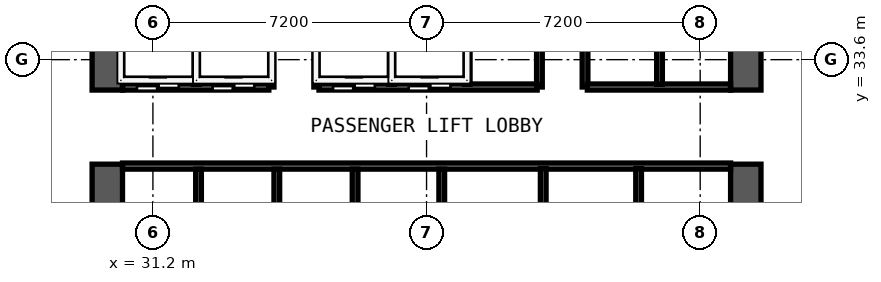
"""IFC4 building model, lengths in metres.
Left out: names, types, materials, properties, quantities, classifications, styles, units other than length and angle.
Written with IfcOpenShell. Run it as: python <this file> out.ifc"""

import sys

from ifc_helpers import new_model, si_unit, direction, frame, frame_2d, origin, place, context, subcontext, project, spatial, rectangle, extrude, element, fill, save


model = new_model("IFC4")
c1 = context("Model", 3, precision=1e-05, world=origin(), true_north=direction((0.0, 1.0)))
c2 = subcontext(c1, "Body", "Model", "MODEL_VIEW")
j1 = project(units=[si_unit("LENGTHUNIT", "METRE"), si_unit("PLANEANGLEUNIT", "RADIAN")], contexts=[c1])
p1 = place(None, origin())
s1 = spatial("IfcSite", under=j1, at=p1, CompositionType="ELEMENT")
p2 = place(p1, origin())
s2 = spatial("IfcBuilding", under=s1, at=p2, CompositionType="ELEMENT")
p3 = place(p2, frame((0.0, 0.0, 47.6)))
s3 = spatial("IfcBuildingStorey", under=s2, at=p3, CompositionType="ELEMENT", Elevation=47.6)
p4 = place(p3, frame((30.0, 26.8, 0.0), z_axis=(0.0, 0.0, 1.0), x_axis=(0.0, 1.0, 0.0)))
e1 = element("IfcWall", 1, at=p4, inside=s3, PredefinedType="SHEAR", context=c2, shape_type="SweptSolid", body=[
    extrude(rectangle(XDim=4.05, YDim=0.8, at=frame_2d((2.025, 0.0))), origin(), (0.0, 0.0, 1.0), 3.6),
])
p5 = place(p3, frame((30.0, 32.8, 0.0), z_axis=(0.0, 0.0, 1.0), x_axis=(0.0, 1.0, 0.0)))
e2 = element("IfcWall", 2, at=p5, inside=s3, PredefinedType="SHEAR", context=c2, shape_type="SweptSolid", body=[
    extrude(rectangle(XDim=10.0, YDim=0.8, at=frame_2d((5.0, 0.0))), origin(), (0.0, 0.0, 1.0), 3.6),
])
p6 = place(p3, frame((46.8, 26.8, 0.0), z_axis=(0.0, 0.0, 1.0), x_axis=(0.0, 1.0, 0.0)))
e3 = element("IfcWall", 3, at=p6, inside=s3, PredefinedType="SHEAR", context=c2, shape_type="SweptSolid", body=[
    extrude(rectangle(XDim=4.05, YDim=0.8, at=frame_2d((2.025, 0.0))), origin(), (0.0, 0.0, 1.0), 3.6),
])
p7 = place(p3, frame((46.8, 32.8, 0.0), z_axis=(0.0, 0.0, 1.0), x_axis=(0.0, 1.0, 0.0)))
e4 = element("IfcWall", 4, at=p7, inside=s3, PredefinedType="SHEAR", context=c2, shape_type="SweptSolid", body=[
    extrude(rectangle(XDim=10.0, YDim=0.8, at=frame_2d((5.0, 0.0))), origin(), (0.0, 0.0, 1.0), 3.6),
])
for number, where, z_axis, x_axis in (
    (5, (34.31, 32.88, 0.0), (0.0, 0.0, 1.0), (0.0, 1.0, 0.0)),
    (6, (35.51, 32.88, 0.0), (0.0, 0.0, 1.0), (0.0, 1.0, 0.0)),
    (7, (41.37, 32.88, 0.0), (0.0, 0.0, 1.0), (0.0, 1.0, 0.0)),
    (8, (42.57, 32.88, 0.0), (0.0, 0.0, 1.0), (0.0, 1.0, 0.0)),
):
    element("IfcWall", number, at=place(p3, frame(where, z_axis=z_axis, x_axis=x_axis)), inside=s3, PredefinedType="SOLIDWALL", context=c2, shape_type="SweptSolid", body=[
        extrude(rectangle(XDim=2.17, YDim=0.15, at=frame_2d((1.085, 0.0))), origin(), (0.0, 0.0, 1.0), 3.6),
    ])
p8 = place(p3, frame((30.4, 32.88, 0.0), z_axis=(0.0, 0.0, 1.0), x_axis=(1.0, 0.0, 0.0)))
e9 = element("IfcWall", 9, at=p8, inside=s3, PredefinedType="SOLIDWALL", context=c2, shape_type="SweptSolid", body=[
    extrude(rectangle(XDim=3.85, YDim=0.16, at=frame_2d((1.925, 0.0))), origin(), (0.0, 0.0, 1.0), 3.6),
])
p9 = place(p8, frame((1.48, 0.0, 0.0), z_axis=(0.0, 0.0, 1.0), x_axis=(-1.0, 0.0, 0.0)))
e10 = element("IfcOpeningElement", 10, at=p9, cuts=e9, PredefinedType="OPENING", context=c2, shape_type="SweptSolid", body=[
    extrude(rectangle(XDim=1.1, YDim=2.2, at=frame_2d((0.55, 1.1))), frame((0.0, 0.09, 0.0), z_axis=(0.0, -1.0, 0.0), x_axis=(1.0, 0.0, 0.0)), (0.0, 0.0, 1.0), 0.18),
])
p10 = place(p8, frame((3.47, 0.0, 0.0), z_axis=(0.0, 0.0, 1.0), x_axis=(-1.0, 0.0, 0.0)))
e11 = element("IfcOpeningElement", 11, at=p10, cuts=e9, PredefinedType="OPENING", context=c2, shape_type="SweptSolid", body=[
    extrude(rectangle(XDim=1.1, YDim=2.2, at=frame_2d((0.55, 1.1))), frame((0.0, 0.09, 0.0), z_axis=(0.0, -1.0, 0.0), x_axis=(1.0, 0.0, 0.0)), (0.0, 0.0, 1.0), 0.18),
])
p11 = place(p3, frame((35.57, 32.88, 0.0), z_axis=(0.0, 0.0, 1.0), x_axis=(1.0, 0.0, 0.0)))
e12 = element("IfcWall", 12, at=p11, inside=s3, PredefinedType="SOLIDWALL", context=c2, shape_type="SweptSolid", body=[
    extrude(rectangle(XDim=5.74, YDim=0.16, at=frame_2d((2.87, 0.0))), origin(), (0.0, 0.0, 1.0), 3.6),
])
p12 = place(p11, frame((1.47, 0.0, 0.0), z_axis=(0.0, 0.0, 1.0), x_axis=(-1.0, 0.0, 0.0)))
e13 = element("IfcOpeningElement", 13, at=p12, cuts=e12, PredefinedType="OPENING", context=c2, shape_type="SweptSolid", body=[
    extrude(rectangle(XDim=1.1, YDim=2.2, at=frame_2d((0.55, 1.1))), frame((0.0, 0.09, 0.0), z_axis=(0.0, -1.0, 0.0), x_axis=(1.0, 0.0, 0.0)), (0.0, 0.0, 1.0), 0.18),
])
p13 = place(p11, frame((3.46, 0.0, 0.0), z_axis=(0.0, 0.0, 1.0), x_axis=(-1.0, 0.0, 0.0)))
e14 = element("IfcOpeningElement", 14, at=p13, cuts=e12, PredefinedType="OPENING", context=c2, shape_type="SweptSolid", body=[
    extrude(rectangle(XDim=1.1, YDim=2.2, at=frame_2d((0.55, 1.1))), frame((0.0, 0.09, 0.0), z_axis=(0.0, -1.0, 0.0), x_axis=(1.0, 0.0, 0.0)), (0.0, 0.0, 1.0), 0.18),
])
p14 = place(p3, frame((42.63, 32.88, 0.0), z_axis=(0.0, 0.0, 1.0), x_axis=(1.0, 0.0, 0.0)))
e15 = element("IfcWall", 15, at=p14, inside=s3, PredefinedType="SOLIDWALL", context=c2, shape_type="SweptSolid", body=[
    extrude(rectangle(XDim=3.77, YDim=0.16, at=frame_2d((1.885, 0.0))), origin(), (0.0, 0.0, 1.0), 3.6),
])
for number, where, z_axis, x_axis in (
    (16, (32.34, 32.95, 0.0), (0.0, 0.0, 1.0), (0.0, 1.0, 0.0)),
    (17, (37.48, 32.95, 0.0), (0.0, 0.0, 1.0), (0.0, 1.0, 0.0)),
    (18, (39.47, 32.95, 0.0), (0.0, 0.0, 1.0), (0.0, 1.0, 0.0)),
    (19, (44.53, 32.95, 0.0), (0.0, 0.0, 1.0), (0.0, 1.0, 0.0)),
):
    element("IfcWall", number, at=place(p3, frame(where, z_axis=z_axis, x_axis=x_axis)), inside=s3, PredefinedType="SOLIDWALL", context=c2, shape_type="SweptSolid", body=[
        extrude(rectangle(XDim=2.05, YDim=0.15, at=frame_2d((1.025, 0.0))), origin(), (0.0, 0.0, 1.0), 3.6),
    ])
p15 = place(p3, frame((30.4, 30.8, 0.0), z_axis=(0.0, 0.0, 1.0), x_axis=(1.0, 0.0, 0.0)))
e20 = element("IfcWall", 20, at=p15, inside=s3, PredefinedType="SOLIDWALL", context=c2, shape_type="SweptSolid", body=[
    extrude(rectangle(XDim=16.0, YDim=0.16, at=frame_2d((8.0, 0.0))), origin(), (0.0, 0.0, 1.0), 3.6),
])
for number, where, z_axis, x_axis in (
    (21, (32.4, 28.735, 0.0), (0.0, 0.0, 1.0), (0.0, 1.0, 0.0)),
    (22, (34.46, 28.735, 0.0), (0.0, 0.0, 1.0), (0.0, 1.0, 0.0)),
    (23, (36.52, 28.735, 0.0), (0.0, 0.0, 1.0), (0.0, 1.0, 0.0)),
    (24, (38.8, 28.735, 0.0), (0.0, 0.0, 1.0), (0.0, 1.0, 0.0)),
):
    element("IfcWall", number, at=place(p3, frame(where, z_axis=z_axis, x_axis=x_axis)), inside=s3, PredefinedType="SOLIDWALL", context=c2, shape_type="SweptSolid", body=[
        extrude(rectangle(XDim=1.985, YDim=0.15, at=frame_2d((0.992, 0.0))), origin(), (0.0, 0.0, 1.0), 3.6),
    ])
for number, where, z_axis, x_axis in (
    (25, (41.47, 28.75, 0.0), (0.0, 0.0, 1.0), (0.0, 1.0, 0.0)),
    (26, (43.98, 28.75, 0.0), (0.0, 0.0, 1.0), (0.0, 1.0, 0.0)),
):
    element("IfcWall", number, at=place(p3, frame(where, z_axis=z_axis, x_axis=x_axis)), inside=s3, PredefinedType="SOLIDWALL", context=c2, shape_type="SweptSolid", body=[
        extrude(rectangle(XDim=1.985, YDim=0.15, at=frame_2d((0.993, 0.0))), origin(), (0.0, 0.0, 1.0), 3.6),
    ])
p16 = place(p9, origin())
e27 = element("IfcDoor", 27, at=p16, inside=s3, OperationType="SLIDING_TO_LEFT", PredefinedType="DOOR", context=c2, shape_type="SweptSolid", body=[
    extrude(rectangle(XDim=1.1, YDim=2.2, at=frame_2d((0.55, 1.1))), frame((0.0, 0.025, 0.0), z_axis=(0.0, -1.0, 0.0), x_axis=(1.0, 0.0, 0.0)), (0.0, 0.0, 1.0), 0.05),
])
fill(e10, e27)
p17 = place(p10, origin())
e28 = element("IfcDoor", 28, at=p17, inside=s3, OperationType="SLIDING_TO_LEFT", PredefinedType="DOOR", context=c2, shape_type="SweptSolid", body=[
    extrude(rectangle(XDim=1.1, YDim=2.2, at=frame_2d((0.55, 1.1))), frame((0.0, 0.025, 0.0), z_axis=(0.0, -1.0, 0.0), x_axis=(1.0, 0.0, 0.0)), (0.0, 0.0, 1.0), 0.05),
])
fill(e11, e28)
p18 = place(p12, origin())
e29 = element("IfcDoor", 29, at=p18, inside=s3, OperationType="SLIDING_TO_LEFT", PredefinedType="DOOR", context=c2, shape_type="SweptSolid", body=[
    extrude(rectangle(XDim=1.1, YDim=2.2, at=frame_2d((0.55, 1.1))), frame((0.0, 0.025, 0.0), z_axis=(0.0, -1.0, 0.0), x_axis=(1.0, 0.0, 0.0)), (0.0, 0.0, 1.0), 0.05),
])
fill(e13, e29)
p19 = place(p13, origin())
e30 = element("IfcDoor", 30, at=p19, inside=s3, OperationType="SLIDING_TO_LEFT", PredefinedType="DOOR", context=c2, shape_type="SweptSolid", body=[
    extrude(rectangle(XDim=1.1, YDim=2.2, at=frame_2d((0.55, 1.1))), frame((0.0, 0.025, 0.0), z_axis=(0.0, -1.0, 0.0), x_axis=(1.0, 0.0, 0.0)), (0.0, 0.0, 1.0), 0.05),
])
fill(e14, e30)
save(model, sys.argv[1])
